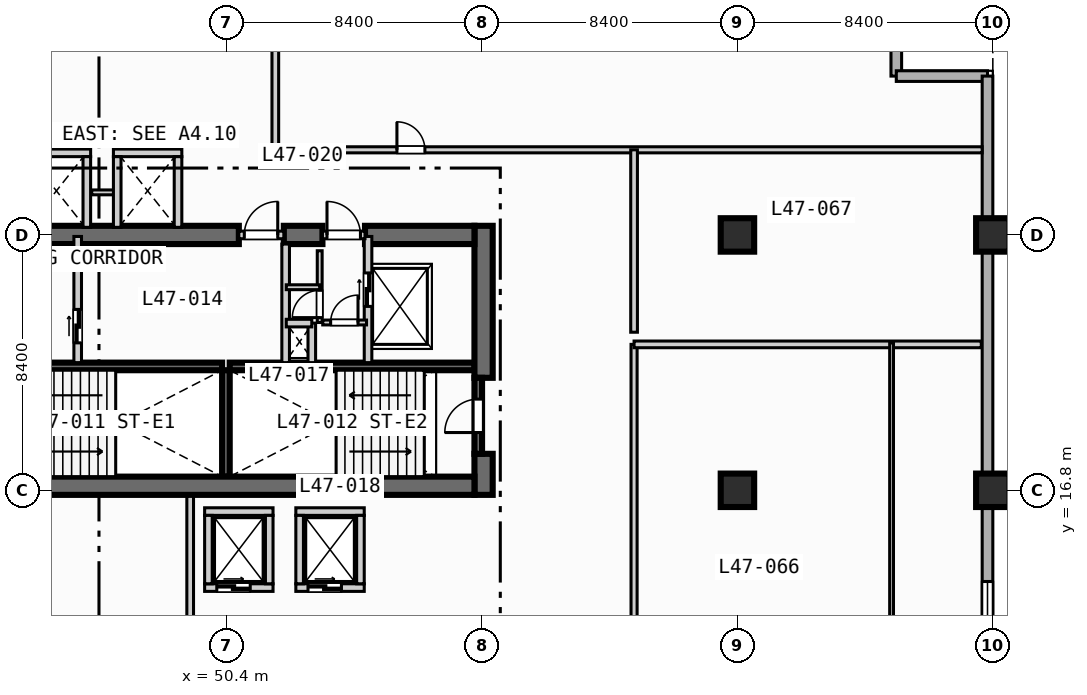
"""IFC4 building model, lengths in metres.
Left out: names, types, materials, properties, quantities, classifications, styles, units other than length and angle.
Written with IfcOpenShell. Run it as: python <this file> out.ifc"""

import sys

from ifc_helpers import new_model, si_unit, direction, frame, frame_2d, origin, origin_2d, place, context, subcontext, project, spatial, rectangle, extrude, element, fill, save


model = new_model("IFC4")
c1 = context("Model", 3, precision=1e-05, world=origin(), true_north=direction((0.0, 1.0)))
c2 = subcontext(c1, "Body", "Model", "MODEL_VIEW")
j1 = project(units=[si_unit("LENGTHUNIT", "METRE"), si_unit("PLANEANGLEUNIT", "RADIAN")], contexts=[c1])
p1 = place(None, origin())
s1 = spatial("IfcSite", under=j1, at=p1, CompositionType="ELEMENT")
p2 = place(p1, origin())
s2 = spatial("IfcBuilding", under=s1, at=p2, CompositionType="ELEMENT")
p3 = place(p2, frame((0.0, 0.0, 193.9)))
s3 = spatial("IfcBuildingStorey", under=s2, at=p3, CompositionType="ELEMENT", Elevation=193.9)
for number, where, z_axis, x_axis in (
    (1, (42.2, 20.875, 0.0), (0.0, 0.0, 1.0), (1.0, 0.0, 0.0)),
    (2, (50.5, 20.875, 0.0), (0.0, 0.0, 1.0), (1.0, 0.0, 0.0)),
):
    element("IfcWall", number, at=place(p3, frame(where, z_axis=z_axis, x_axis=x_axis)), inside=s3, PredefinedType="SOLIDWALL", context=c2, shape_type="SweptSolid", body=[
        extrude(rectangle(XDim=8.05, YDim=0.25, at=frame_2d((4.025, 0.0))), origin(), (0.0, 0.0, 1.0), 3.47),
    ])
p4 = place(p3, frame((50.375, 17.25, 0.0), z_axis=(0.0, 0.0, 1.0), x_axis=(0.0, 1.0, 0.0)))
e3 = element("IfcWall", 3, at=p4, inside=s3, PredefinedType="SOLIDWALL", context=c2, shape_type="SweptSolid", body=[
    extrude(rectangle(XDim=3.5, YDim=0.25, at=frame_2d((1.75, 0.0))), origin(), (0.0, 0.0, 1.0), 3.47),
])
p5 = place(p3, frame((58.85, 16.65, 0.0), z_axis=(0.0, 0.0, 1.0), x_axis=(0.0, 1.0, 0.0)))
e4 = element("IfcWall", 4, at=p5, inside=s3, PredefinedType="SHEAR", context=c2, shape_type="SweptSolid", body=[
    extrude(rectangle(XDim=1.35, YDim=0.6, at=frame_2d((0.675, 0.0))), origin(), (0.0, 0.0, 1.0), 3.47),
])
p6 = place(p3, frame((58.85, 20.5, 0.0), z_axis=(0.0, 0.0, 1.0), x_axis=(0.0, 1.0, 0.0)))
e5 = element("IfcWall", 5, at=p6, inside=s3, PredefinedType="SHEAR", context=c2, shape_type="SweptSolid", body=[
    extrude(rectangle(XDim=5.0, YDim=0.6, at=frame_2d((2.5, 0.0))), origin(), (0.0, 0.0, 1.0), 3.47),
])
p7 = place(p3, frame((42.2, 16.95, 0.0), z_axis=(0.0, 0.0, 1.0), x_axis=(1.0, 0.0, 0.0)))
e6 = element("IfcWall", 6, at=p7, inside=s3, PredefinedType="SHEAR", context=c2, shape_type="SweptSolid", body=[
    extrude(rectangle(XDim=16.35, YDim=0.6, at=frame_2d((8.175, 0.0))), origin(), (0.0, 0.0, 1.0), 3.47),
])
p8 = place(p3, frame((42.2, 25.2, 0.0), z_axis=(0.0, 0.0, 1.0), x_axis=(1.0, 0.0, 0.0)))
e7 = element("IfcWall", 7, at=p8, inside=s3, PredefinedType="SHEAR", context=c2, shape_type="SweptSolid", body=[
    extrude(rectangle(XDim=8.6, YDim=0.6, at=frame_2d((4.3, 0.0))), origin(), (0.0, 0.0, 1.0), 3.47),
])
p9 = place(p3, frame((52.28, 25.2, 0.0), z_axis=(0.0, 0.0, 1.0), x_axis=(1.0, 0.0, 0.0)))
e8 = element("IfcWall", 8, at=p9, inside=s3, PredefinedType="SHEAR", context=c2, shape_type="SweptSolid", body=[
    extrude(rectangle(XDim=1.27, YDim=0.6, at=frame_2d((0.635, 0.0))), origin(), (0.0, 0.0, 1.0), 3.47),
])
p10 = place(p3, frame((54.95, 25.2, 0.0), z_axis=(0.0, 0.0, 1.0), x_axis=(1.0, 0.0, 0.0)))
e9 = element("IfcWall", 9, at=p10, inside=s3, PredefinedType="SHEAR", context=c2, shape_type="SweptSolid", body=[
    extrude(rectangle(XDim=3.6, YDim=0.6, at=frame_2d((1.8, 0.0))), origin(), (0.0, 0.0, 1.0), 3.47),
])
for number, where, z_axis, x_axis in (
    (10, (67.2, 16.8, 0.0), (0.0, 0.0, 1.0), (1.0, 0.0, 0.0)),
    (11, (67.2, 25.2, 0.0), (0.0, 0.0, 1.0), (1.0, 0.0, 0.0)),
    (12, (75.6, 16.8, 0.0), (0.0, 0.0, 1.0), (1.0, 0.0, 0.0)),
    (13, (75.6, 25.2, 0.0), (0.0, 0.0, 1.0), (1.0, 0.0, 0.0)),
):
    element("IfcColumn", number, at=place(p3, frame(where, z_axis=z_axis, x_axis=x_axis)), inside=s3, PredefinedType="COLUMN", context=c2, shape_type="SweptSolid", body=[
        extrude(rectangle(XDim=1.1, YDim=1.1, at=origin_2d()), origin(), (0.0, 0.0, 1.0), 3.7),
    ])
for number, where, z_axis, x_axis in (
    (14, (72.425, 33.425, 0.0), (0.0, 0.0, 1.0), (0.0, -1.0, 0.0)),
    (15, (72.425, 30.425, 0.0), (0.0, 0.0, 1.0), (1.0, 0.0, 0.0)),
):
    element("IfcWall", number, at=place(p3, frame(where, z_axis=z_axis, x_axis=x_axis)), inside=s3, PredefinedType="STANDARD", context=c2, shape_type="SweptSolid", body=[
        extrude(rectangle(XDim=3.0, YDim=0.35, at=frame_2d((1.5, 0.0))), origin(), (0.0, 0.0, 1.0), 3.47),
    ])
p11 = place(p3, frame((75.425, 30.425, 0.0), z_axis=(0.0, 0.0, 1.0), x_axis=(0.0, -1.0, 0.0)))
e16 = element("IfcWall", 16, at=p11, inside=s3, PredefinedType="STANDARD", context=c2, shape_type="SweptSolid", body=[
    extrude(rectangle(XDim=27.25, YDim=0.35, at=frame_2d((13.625, 0.0))), origin(), (0.0, 0.0, 1.0), 3.47),
])
p12 = place(p11, frame((16.625, 0.0, 0.85)))
e17 = element("IfcOpeningElement", 17, at=p12, cuts=e16, PredefinedType="OPENING", context=c2, shape_type="SweptSolid", body=[
    extrude(rectangle(XDim=2.4, YDim=1.95, at=frame_2d((1.2, 0.975))), frame((0.0, 0.185, 0.0), z_axis=(0.0, -1.0, 0.0), x_axis=(1.0, 0.0, 0.0)), (0.0, 0.0, 1.0), 0.37),
])
p13 = place(p3, frame((58.675, 18.0, 0.0), z_axis=(0.0, 0.0, 1.0), x_axis=(0.0, 1.0, 0.0)))
e18 = element("IfcWall", 18, at=p13, inside=s3, PredefinedType="SOLIDWALL", context=c2, shape_type="SweptSolid", body=[
    extrude(rectangle(XDim=2.5, YDim=0.25, at=frame_2d((1.25, 0.0))), origin(), (0.0, 0.0, 1.0), 3.47),
])
p14 = place(p13, frame((0.7, 0.0, 0.0)))
e19 = element("IfcOpeningElement", 19, at=p14, cuts=e18, PredefinedType="OPENING", context=c2, shape_type="SweptSolid", body=[
    extrude(rectangle(XDim=1.1, YDim=2.15, at=frame_2d((0.55, 1.075))), frame((0.0, 0.135, 0.0), z_axis=(0.0, -1.0, 0.0), x_axis=(1.0, 0.0, 0.0)), (0.0, 0.0, 1.0), 0.27),
])
p15 = place(p3, frame((45.5, 21.0, 0.0), z_axis=(0.0, 0.0, 1.0), x_axis=(0.0, 1.0, 0.0)))
e20 = element("IfcWall", 20, at=p15, inside=s3, PredefinedType="SOLIDWALL", context=c2, shape_type="SweptSolid", body=[
    extrude(rectangle(XDim=4.15, YDim=0.25, at=frame_2d((2.075, 0.0))), origin(), (0.0, 0.0, 1.0), 3.47),
])
p16 = place(p15, frame((0.65, 0.0, 0.0)))
e21 = element("IfcOpeningElement", 21, at=p16, cuts=e20, PredefinedType="OPENING", context=c2, shape_type="SweptSolid", body=[
    extrude(rectangle(XDim=1.1, YDim=2.15, at=frame_2d((0.55, 1.075))), frame((0.0, 0.135, 0.0), z_axis=(0.0, -1.0, 0.0), x_axis=(1.0, 0.0, 0.0)), (0.0, 0.0, 1.0), 0.27),
])
p17 = place(p3, frame((50.8, 25.2, 0.0), z_axis=(0.0, 0.0, 1.0), x_axis=(1.0, 0.0, 0.0)))
e22 = element("IfcWall", 22, at=p17, inside=s3, PredefinedType="SOLIDWALL", context=c2, shape_type="SweptSolid", body=[
    extrude(rectangle(XDim=1.48, YDim=0.25, at=frame_2d((0.74, 0.0))), origin(), (0.0, 0.0, 1.0), 3.47),
])
p18 = place(p17, frame((0.18, 0.0, 0.0)))
e23 = element("IfcOpeningElement", 23, at=p18, cuts=e22, PredefinedType="OPENING", context=c2, shape_type="SweptSolid", body=[
    extrude(rectangle(XDim=1.1, YDim=2.15, at=frame_2d((0.55, 1.075))), frame((0.0, 0.135, 0.0), z_axis=(0.0, -1.0, 0.0), x_axis=(1.0, 0.0, 0.0)), (0.0, 0.0, 1.0), 0.27),
])
p19 = place(p3, frame((52.34, 21.0, 0.0), z_axis=(0.0, 0.0, 1.0), x_axis=(0.0, 1.0, 0.0)))
e24 = element("IfcWall", 24, at=p19, inside=s3, PredefinedType="SOLIDWALL", context=c2, shape_type="SweptSolid", body=[
    extrude(rectangle(XDim=3.9, YDim=0.25, at=frame_2d((1.95, 0.0))), origin(), (0.0, 0.0, 1.0), 3.47),
])
p20 = place(p3, frame((55.05, 21.0, 0.0), z_axis=(0.0, 0.0, 1.0), x_axis=(0.0, 1.0, 0.0)))
e25 = element("IfcWall", 25, at=p20, inside=s3, PredefinedType="SOLIDWALL", context=c2, shape_type="SweptSolid", body=[
    extrude(rectangle(XDim=4.15, YDim=0.25, at=frame_2d((2.075, 0.0))), origin(), (0.0, 0.0, 1.0), 3.47),
])
p21 = place(p20, frame((1.85, 0.0, 0.0)))
e26 = element("IfcOpeningElement", 26, at=p21, cuts=e25, PredefinedType="OPENING", context=c2, shape_type="SweptSolid", body=[
    extrude(rectangle(XDim=1.1, YDim=2.15, at=frame_2d((0.55, 1.075))), frame((0.0, 0.135, 0.0), z_axis=(0.0, -1.0, 0.0), x_axis=(1.0, 0.0, 0.0)), (0.0, 0.0, 1.0), 0.27),
])
p22 = place(p3, frame((53.55, 25.2, 0.0), z_axis=(0.0, 0.0, 1.0), x_axis=(1.0, 0.0, 0.0)))
e27 = element("IfcWall", 27, at=p22, inside=s3, PredefinedType="SOLIDWALL", context=c2, shape_type="SweptSolid", body=[
    extrude(rectangle(XDim=1.4, YDim=0.25, at=frame_2d((0.7, 0.0))), origin(), (0.0, 0.0, 1.0), 3.47),
])
p23 = place(p22, frame((0.15, 0.0, 0.0)))
e28 = element("IfcOpeningElement", 28, at=p23, cuts=e27, PredefinedType="OPENING", context=c2, shape_type="SweptSolid", body=[
    extrude(rectangle(XDim=1.1, YDim=2.15, at=frame_2d((0.55, 1.075))), frame((0.0, 0.135, 0.0), z_axis=(0.0, -1.0, 0.0), x_axis=(1.0, 0.0, 0.0)), (0.0, 0.0, 1.0), 0.27),
])
p24 = place(p3, frame((53.2, 21.0, 0.0), z_axis=(0.0, 0.0, 1.0), x_axis=(0.0, 1.0, 0.0)))
e29 = element("IfcWall", 29, at=p24, inside=s3, PredefinedType="SOLIDWALL", context=c2, shape_type="SweptSolid", body=[
    extrude(rectangle(XDim=1.3, YDim=0.25, at=frame_2d((0.65, 0.0))), origin(), (0.0, 0.0, 1.0), 3.47),
])
p25 = place(p3, frame((52.36, 22.3, 0.0), z_axis=(0.0, 0.0, 1.0), x_axis=(1.0, 0.0, 0.0)))
e30 = element("IfcWall", 30, at=p25, inside=s3, PredefinedType="SOLIDWALL", context=c2, shape_type="SweptSolid", body=[
    extrude(rectangle(XDim=0.84, YDim=0.25, at=frame_2d((0.42, 0.0))), origin(), (0.0, 0.0, 1.0), 3.47),
])
p26 = place(p3, frame((53.56, 22.32, 0.0), z_axis=(0.0, 0.0, 1.0), x_axis=(1.0, 0.0, 0.0)))
e31 = element("IfcWall", 31, at=p26, inside=s3, PredefinedType="PARTITIONING", context=c2, shape_type="SweptSolid", body=[
    extrude(rectangle(XDim=1.44, YDim=0.16, at=frame_2d((0.72, 0.0))), origin(), (0.0, 0.0, 1.0), 3.47),
])
p27 = place(p26, frame((0.26, 0.0, 0.0)))
e32 = element("IfcOpeningElement", 32, at=p27, cuts=e31, PredefinedType="OPENING", context=c2, shape_type="SweptSolid", body=[
    extrude(rectangle(XDim=0.9, YDim=2.1, at=frame_2d((0.45, 1.05))), frame((0.0, 0.09, 0.0), z_axis=(0.0, -1.0, 0.0), x_axis=(1.0, 0.0, 0.0)), (0.0, 0.0, 1.0), 0.18),
])
p28 = place(p3, frame((53.46, 22.32, 0.0), z_axis=(0.0, 0.0, 1.0), x_axis=(0.0, 1.0, 0.0)))
e33 = element("IfcWall", 33, at=p28, inside=s3, PredefinedType="PARTITIONING", context=c2, shape_type="SweptSolid", body=[
    extrude(rectangle(XDim=2.36, YDim=0.16, at=frame_2d((1.18, 0.0))), origin(), (0.0, 0.0, 1.0), 3.47),
])
p29 = place(p28, frame((0.16, 0.0, 0.0)))
e34 = element("IfcOpeningElement", 34, at=p29, cuts=e33, PredefinedType="OPENING", context=c2, shape_type="SweptSolid", body=[
    extrude(rectangle(XDim=0.9, YDim=2.1, at=frame_2d((0.45, 1.05))), frame((0.0, 0.09, 0.0), z_axis=(0.0, -1.0, 0.0), x_axis=(1.0, 0.0, 0.0)), (0.0, 0.0, 1.0), 0.18),
])
p30 = place(p3, frame((52.36, 23.48, 0.0), z_axis=(0.0, 0.0, 1.0), x_axis=(1.0, 0.0, 0.0)))
e35 = element("IfcWall", 35, at=p30, inside=s3, PredefinedType="PARTITIONING", context=c2, shape_type="SweptSolid", body=[
    extrude(rectangle(XDim=1.1, YDim=0.16, at=frame_2d((0.55, 0.0))), origin(), (0.0, 0.0, 1.0), 3.47),
])
p31 = place(p3, frame((49.675, 13.6, 0.0), z_axis=(0.0, 0.0, 1.0), x_axis=(1.0, 0.0, 0.0)))
e36 = element("IfcWall", 36, at=p31, inside=s3, PredefinedType="SOLIDWALL", context=c2, shape_type="SweptSolid", body=[
    extrude(rectangle(XDim=2.25, YDim=0.25, at=frame_2d((1.125, 0.0))), origin(), (0.0, 0.0, 1.0), 3.47),
])
p32 = place(p31, frame((0.4, 0.0, 0.0)))
e37 = element("IfcOpeningElement", 37, at=p32, cuts=e36, PredefinedType="OPENING", context=c2, shape_type="SweptSolid", body=[
    extrude(rectangle(XDim=1.1, YDim=2.15, at=frame_2d((0.55, 1.075))), frame((0.0, 0.135, 0.0), z_axis=(0.0, -1.0, 0.0), x_axis=(1.0, 0.0, 0.0)), (0.0, 0.0, 1.0), 0.27),
])
for number, where, z_axis, x_axis in (
    (38, (49.675, 16.1, 0.0), (0.0, 0.0, 1.0), (1.0, 0.0, 0.0)),
    (39, (49.8, 13.725, 0.0), (0.0, 0.0, 1.0), (0.0, 1.0, 0.0)),
    (40, (51.8, 13.725, 0.0), (0.0, 0.0, 1.0), (0.0, 1.0, 0.0)),
):
    element("IfcWall", number, at=place(p3, frame(where, z_axis=z_axis, x_axis=x_axis)), inside=s3, PredefinedType="SOLIDWALL", context=c2, shape_type="SweptSolid", body=[
        extrude(rectangle(XDim=2.25, YDim=0.25, at=frame_2d((1.125, 0.0))), origin(), (0.0, 0.0, 1.0), 3.47),
    ])
p33 = place(p3, frame((52.675, 13.6, 0.0), z_axis=(0.0, 0.0, 1.0), x_axis=(1.0, 0.0, 0.0)))
e41 = element("IfcWall", 41, at=p33, inside=s3, PredefinedType="SOLIDWALL", context=c2, shape_type="SweptSolid", body=[
    extrude(rectangle(XDim=2.25, YDim=0.25, at=frame_2d((1.125, 0.0))), origin(), (0.0, 0.0, 1.0), 3.47),
])
p34 = place(p33, frame((0.4, 0.0, 0.0)))
e42 = element("IfcOpeningElement", 42, at=p34, cuts=e41, PredefinedType="OPENING", context=c2, shape_type="SweptSolid", body=[
    extrude(rectangle(XDim=1.1, YDim=2.15, at=frame_2d((0.55, 1.075))), frame((0.0, 0.135, 0.0), z_axis=(0.0, -1.0, 0.0), x_axis=(1.0, 0.0, 0.0)), (0.0, 0.0, 1.0), 0.27),
])
for number, where, z_axis, x_axis in (
    (43, (52.675, 16.1, 0.0), (0.0, 0.0, 1.0), (1.0, 0.0, 0.0)),
    (44, (52.8, 13.725, 0.0), (0.0, 0.0, 1.0), (0.0, 1.0, 0.0)),
    (45, (54.8, 13.725, 0.0), (0.0, 0.0, 1.0), (0.0, 1.0, 0.0)),
    (46, (43.675, 27.9, 0.0), (0.0, 0.0, 1.0), (1.0, 0.0, 0.0)),
):
    element("IfcWall", number, at=place(p3, frame(where, z_axis=z_axis, x_axis=x_axis)), inside=s3, PredefinedType="SOLIDWALL", context=c2, shape_type="SweptSolid", body=[
        extrude(rectangle(XDim=2.25, YDim=0.25, at=frame_2d((1.125, 0.0))), origin(), (0.0, 0.0, 1.0), 3.47),
    ])
p35 = place(p3, frame((45.8, 25.45, 0.0), z_axis=(0.0, 0.0, 1.0), x_axis=(0.0, 1.0, 0.0)))
e47 = element("IfcWall", 47, at=p35, inside=s3, PredefinedType="SOLIDWALL", context=c2, shape_type="SweptSolid", body=[
    extrude(rectangle(XDim=2.325, YDim=0.25, at=frame_2d((1.163, 0.0))), origin(), (0.0, 0.0, 1.0), 3.47),
])
p36 = place(p3, frame((45.96, 26.6, 0.0), z_axis=(0.0, 0.0, 1.0), x_axis=(1.0, 0.0, 0.0)))
e48 = element("IfcWall", 48, at=p36, inside=s3, PredefinedType="PARTITIONING", context=c2, shape_type="SweptSolid", body=[
    extrude(rectangle(XDim=0.88, YDim=0.16, at=frame_2d((0.44, 0.0))), origin(), (0.0, 0.0, 1.0), 3.47),
])
p37 = place(p3, frame((46.675, 27.9, 0.0), z_axis=(0.0, 0.0, 1.0), x_axis=(1.0, 0.0, 0.0)))
e49 = element("IfcWall", 49, at=p37, inside=s3, PredefinedType="SOLIDWALL", context=c2, shape_type="SweptSolid", body=[
    extrude(rectangle(XDim=2.25, YDim=0.25, at=frame_2d((1.125, 0.0))), origin(), (0.0, 0.0, 1.0), 3.47),
])
for number, where, z_axis, x_axis in (
    (50, (46.8, 25.45, 0.0), (0.0, 0.0, 1.0), (0.0, 1.0, 0.0)),
    (51, (48.8, 25.45, 0.0), (0.0, 0.0, 1.0), (0.0, 1.0, 0.0)),
):
    element("IfcWall", number, at=place(p3, frame(where, z_axis=z_axis, x_axis=x_axis)), inside=s3, PredefinedType="SOLIDWALL", context=c2, shape_type="SweptSolid", body=[
        extrude(rectangle(XDim=2.325, YDim=0.25, at=frame_2d((1.163, 0.0))), origin(), (0.0, 0.0, 1.0), 3.47),
    ])
p38 = place(p3, frame((49.2, 0.35, 0.0), z_axis=(0.0, 0.0, 1.0), x_axis=(0.0, 1.0, 0.0)))
e52 = element("IfcWall", 52, at=p38, inside=s3, PredefinedType="PARTITIONING", context=c2, shape_type="SweptSolid", body=[
    extrude(rectangle(XDim=16.25, YDim=0.22, at=frame_2d((8.125, 0.0))), origin(), (0.0, 0.0, 1.0), 3.47),
])
p39 = place(p3, frame((63.8, 3.4, 0.0), z_axis=(0.0, 0.0, 1.0), x_axis=(0.0, 1.0, 0.0)))
e53 = element("IfcWall", 53, at=p39, inside=s3, PredefinedType="PARTITIONING", context=c2, shape_type="SweptSolid", body=[
    extrude(rectangle(XDim=18.2, YDim=0.2, at=frame_2d((9.1, 0.0))), origin(), (0.0, 0.0, 1.0), 3.47),
])
p40 = place(p39, frame((6.2, 0.0, 0.0)))
e54 = element("IfcOpeningElement", 54, at=p40, cuts=e53, PredefinedType="OPENING", context=c2, shape_type="SweptSolid", body=[
    extrude(rectangle(XDim=1.0, YDim=2.15, at=frame_2d((0.5, 1.075))), frame((0.0, 0.11, 0.0), z_axis=(0.0, -1.0, 0.0), x_axis=(1.0, 0.0, 0.0)), (0.0, 0.0, 1.0), 0.22),
])
p41 = place(p3, frame((63.8, 21.6, 0.0), z_axis=(0.0, 0.0, 1.0), x_axis=(1.0, 0.0, 0.0)))
e55 = element("IfcWall", 55, at=p41, inside=s3, PredefinedType="PARTITIONING", context=c2, shape_type="SweptSolid", body=[
    extrude(rectangle(XDim=11.42, YDim=0.22, at=frame_2d((5.71, 0.0))), origin(), (0.0, 0.0, 1.0), 3.47),
])
p42 = place(p3, frame((72.27, 3.25, 0.0), z_axis=(0.0, 0.0, 1.0), x_axis=(0.0, 1.0, 0.0)))
e56 = element("IfcWall", 56, at=p42, inside=s3, PredefinedType="PARTITIONING", context=c2, shape_type="SweptSolid", body=[
    extrude(rectangle(XDim=18.4, YDim=0.125, at=frame_2d((9.2, 0.0))), origin(), (0.0, 0.0, 1.0), 3.47),
])
p43 = place(p42, frame((8.19, 0.0, 0.0)))
e57 = element("IfcOpeningElement", 57, at=p43, cuts=e56, PredefinedType="OPENING", context=c2, shape_type="SweptSolid", body=[
    extrude(rectangle(XDim=0.92, YDim=2.1, at=frame_2d((0.46, 1.05))), frame((0.0, 0.073, 0.0), z_axis=(0.0, -1.0, 0.0), x_axis=(1.0, 0.0, 0.0)), (0.0, 0.0, 1.0), 0.145),
])
p44 = place(p3, frame((52.0, 28.0, 0.0), z_axis=(0.0, 0.0, 1.0), x_axis=(1.0, 0.0, 0.0)))
e58 = element("IfcWall", 58, at=p44, inside=s3, PredefinedType="PARTITIONING", context=c2, shape_type="SweptSolid", body=[
    extrude(rectangle(XDim=23.25, YDim=0.2, at=frame_2d((11.625, 0.0))), origin(), (0.0, 0.0, 1.0), 3.47),
])
p45 = place(p44, frame((4.0, 0.0, 0.0)))
e59 = element("IfcOpeningElement", 59, at=p45, cuts=e58, PredefinedType="OPENING", context=c2, shape_type="SweptSolid", body=[
    extrude(rectangle(XDim=0.92, YDim=2.1, at=frame_2d((0.46, 1.05))), frame((0.0, 0.11, 0.0), z_axis=(0.0, -1.0, 0.0), x_axis=(1.0, 0.0, 0.0)), (0.0, 0.0, 1.0), 0.22),
])
p46 = place(p3, frame((52.0, 28.0, 0.0), z_axis=(0.0, 0.0, 1.0), x_axis=(0.0, 1.0, 0.0)))
e60 = element("IfcWall", 60, at=p46, inside=s3, PredefinedType="PARTITIONING", context=c2, shape_type="SweptSolid", body=[
    extrude(rectangle(XDim=5.3, YDim=0.22, at=frame_2d((2.65, 0.0))), origin(), (0.0, 0.0, 1.0), 3.47),
])
p47 = place(p3, frame((63.8, 22.0, 0.0), z_axis=(0.0, 0.0, 1.0), x_axis=(0.0, 1.0, 0.0)))
e61 = element("IfcWall", 61, at=p47, inside=s3, PredefinedType="PARTITIONING", context=c2, shape_type="SweptSolid", body=[
    extrude(rectangle(XDim=6.0, YDim=0.22, at=frame_2d((3.0, 0.0))), origin(), (0.0, 0.0, 1.0), 3.47),
])
p48 = place(p12, origin())
e62 = element("IfcWindow", 62, at=p48, inside=s3, PartitioningType="SINGLE_PANEL", PredefinedType="WINDOW", context=c2, shape_type="SweptSolid", body=[
    extrude(rectangle(XDim=2.4, YDim=1.95, at=frame_2d((1.2, 0.975))), frame((0.0, 0.03, 0.0), z_axis=(0.0, -1.0, 0.0), x_axis=(1.0, 0.0, 0.0)), (0.0, 0.0, 1.0), 0.06),
])
fill(e17, e62)
p49 = place(p14, origin())
e63 = element("IfcDoor", 63, at=p49, inside=s3, OperationType="SINGLE_SWING_LEFT", PredefinedType="DOOR", context=c2, shape_type="SweptSolid", body=[
    extrude(rectangle(XDim=1.1, YDim=2.15, at=frame_2d((0.55, 1.075))), frame((0.0, 0.025, 0.0), z_axis=(0.0, -1.0, 0.0), x_axis=(1.0, 0.0, 0.0)), (0.0, 0.0, 1.0), 0.05),
])
fill(e19, e63)
p50 = place(p16, origin())
e64 = element("IfcDoor", 64, at=p50, inside=s3, OperationType="SLIDING_TO_LEFT", PredefinedType="DOOR", context=c2, shape_type="SweptSolid", body=[
    extrude(rectangle(XDim=1.1, YDim=2.15, at=frame_2d((0.55, 1.075))), frame((0.0, 0.025, 0.0), z_axis=(0.0, -1.0, 0.0), x_axis=(1.0, 0.0, 0.0)), (0.0, 0.0, 1.0), 0.05),
])
fill(e21, e64)
p51 = place(p18, origin())
e65 = element("IfcDoor", 65, at=p51, inside=s3, OperationType="SINGLE_SWING_RIGHT", PredefinedType="DOOR", context=c2, shape_type="SweptSolid", body=[
    extrude(rectangle(XDim=1.1, YDim=2.15, at=frame_2d((0.55, 1.075))), frame((0.0, 0.025, 0.0), z_axis=(0.0, -1.0, 0.0), x_axis=(1.0, 0.0, 0.0)), (0.0, 0.0, 1.0), 0.05),
])
fill(e23, e65)
p52 = place(p21, origin())
e66 = element("IfcDoor", 66, at=p52, inside=s3, OperationType="SLIDING_TO_LEFT", PredefinedType="DOOR", context=c2, shape_type="SweptSolid", body=[
    extrude(rectangle(XDim=1.1, YDim=2.15, at=frame_2d((0.55, 1.075))), frame((0.0, 0.025, 0.0), z_axis=(0.0, -1.0, 0.0), x_axis=(1.0, 0.0, 0.0)), (0.0, 0.0, 1.0), 0.05),
])
fill(e26, e66)
p53 = place(p23, origin())
e67 = element("IfcDoor", 67, at=p53, inside=s3, OperationType="SINGLE_SWING_LEFT", PredefinedType="DOOR", context=c2, shape_type="SweptSolid", body=[
    extrude(rectangle(XDim=1.1, YDim=2.15, at=frame_2d((0.55, 1.075))), frame((0.0, 0.025, 0.0), z_axis=(0.0, -1.0, 0.0), x_axis=(1.0, 0.0, 0.0)), (0.0, 0.0, 1.0), 0.05),
])
fill(e28, e67)
p54 = place(p27, origin())
e68 = element("IfcDoor", 68, at=p54, inside=s3, OperationType="SINGLE_SWING_RIGHT", PredefinedType="DOOR", context=c2, shape_type="SweptSolid", body=[
    extrude(rectangle(XDim=0.9, YDim=2.1, at=frame_2d((0.45, 1.05))), frame((0.0, 0.025, 0.0), z_axis=(0.0, -1.0, 0.0), x_axis=(1.0, 0.0, 0.0)), (0.0, 0.0, 1.0), 0.05),
])
fill(e32, e68)
p55 = place(p29, origin())
e69 = element("IfcDoor", 69, at=p55, inside=s3, OperationType="SINGLE_SWING_LEFT", PredefinedType="DOOR", context=c2, shape_type="SweptSolid", body=[
    extrude(rectangle(XDim=0.9, YDim=2.1, at=frame_2d((0.45, 1.05))), frame((0.0, 0.025, 0.0), z_axis=(0.0, -1.0, 0.0), x_axis=(1.0, 0.0, 0.0)), (0.0, 0.0, 1.0), 0.05),
])
fill(e34, e69)
p56 = place(p32, origin())
e70 = element("IfcDoor", 70, at=p56, inside=s3, OperationType="SLIDING_TO_LEFT", PredefinedType="DOOR", context=c2, shape_type="SweptSolid", body=[
    extrude(rectangle(XDim=1.1, YDim=2.15, at=frame_2d((0.55, 1.075))), frame((0.0, 0.025, 0.0), z_axis=(0.0, -1.0, 0.0), x_axis=(1.0, 0.0, 0.0)), (0.0, 0.0, 1.0), 0.05),
])
fill(e37, e70)
p57 = place(p34, origin())
e71 = element("IfcDoor", 71, at=p57, inside=s3, OperationType="SLIDING_TO_LEFT", PredefinedType="DOOR", context=c2, shape_type="SweptSolid", body=[
    extrude(rectangle(XDim=1.1, YDim=2.15, at=frame_2d((0.55, 1.075))), frame((0.0, 0.025, 0.0), z_axis=(0.0, -1.0, 0.0), x_axis=(1.0, 0.0, 0.0)), (0.0, 0.0, 1.0), 0.05),
])
fill(e42, e71)
p58 = place(p45, origin())
e72 = element("IfcDoor", 72, at=p58, inside=s3, OperationType="SINGLE_SWING_LEFT", PredefinedType="DOOR", context=c2, shape_type="SweptSolid", body=[
    extrude(rectangle(XDim=0.92, YDim=2.1, at=frame_2d((0.46, 1.05))), frame((0.0, 0.025, 0.0), z_axis=(0.0, -1.0, 0.0), x_axis=(1.0, 0.0, 0.0)), (0.0, 0.0, 1.0), 0.05),
])
fill(e59, e72)
save(model, sys.argv[1])
